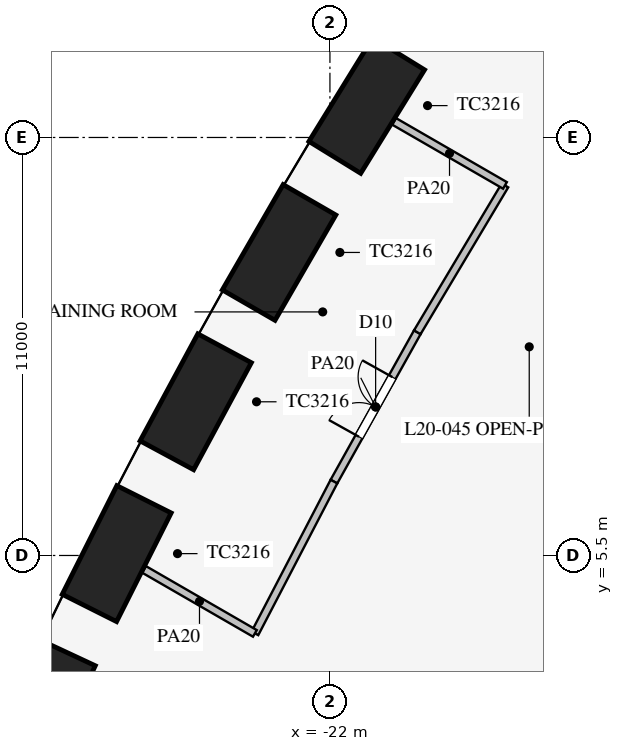
"""IFC4 building model, lengths in metres.
Left out: names, types, materials, properties, quantities, classifications, styles, units other than length and angle.
Written with IfcOpenShell. Run it as: python <this file> out.ifc"""

import sys

from ifc_helpers import new_model, si_unit, direction, frame, frame_2d, origin, origin_2d, place, context, subcontext, project, spatial, rectangle, extrude, element, fill, save


model = new_model("IFC4")
c1 = context("Model", 3, precision=1e-05, world=origin(), true_north=direction((0.0, 1.0)))
c2 = subcontext(c1, "Body", "Model", "MODEL_VIEW")
j1 = project(units=[si_unit("LENGTHUNIT", "METRE"), si_unit("PLANEANGLEUNIT", "RADIAN")], contexts=[c1])
p1 = place(None, origin())
s1 = spatial("IfcSite", under=j1, at=p1, CompositionType="ELEMENT")
p2 = place(p1, origin())
s2 = spatial("IfcBuilding", under=s1, at=p2, CompositionType="ELEMENT")
p3 = place(p2, frame((0.0, 0.0, 87.9)))
s3 = spatial("IfcBuildingStorey", under=s2, at=p3, CompositionType="ELEMENT", Elevation=87.9)
for number, where, z_axis, x_axis in (
    (1, (-21.031, 17.339, 0.0), (0.0, 0.0, 1.0), (-0.525, -0.851, 0.0)),
    (2, (-23.338, 13.474, 0.0), (0.0, 0.0, 1.0), (-0.5, -0.866, 0.0)),
    (3, (-25.531, 9.544, 0.0), (0.0, 0.0, 1.0), (-0.475, -0.88, 0.0)),
    (4, (-27.611, 5.549, 0.0), (0.0, 0.0, 1.0), (-0.449, -0.894, 0.0)),
    (5, (-29.576, 1.487, 0.0), (0.0, 0.0, 1.0), (-0.423, -0.906, 0.0)),
):
    element("IfcColumn", number, at=place(p3, frame(where, z_axis=z_axis, x_axis=x_axis)), inside=s3, PredefinedType="COLUMN", context=c2, shape_type="SweptSolid", body=[
        extrude(rectangle(XDim=3.2, YDim=1.6, at=origin_2d()), origin(), (0.0, 0.0, 1.0), 4.2),
    ])
p4 = place(p3, frame((-5.773, 16.0, 0.0), z_axis=(0.0, 0.0, 1.0), x_axis=(-0.500002442456, -0.866023993627, 0.0)))
e6 = element("IfcWall", 6, at=p4, inside=s3, PredefinedType="SHEAR", context=c2, shape_type="SweptSolid", body=[
    extrude(rectangle(XDim=21.939, YDim=0.8, at=frame_2d((10.97, 0.0))), origin(), (0.0, 0.0, 1.0), 4.2),
])
p5 = place(p4, frame((17.27, 0.0, 0.0)))
e7 = element("IfcOpeningElement", 7, at=p5, cuts=e6, PredefinedType="OPENING", context=c2, shape_type="SweptSolid", body=[
    extrude(rectangle(XDim=1.2, YDim=2.1, at=frame_2d((0.6, 1.05))), frame((0.0, 0.41, 0.0), z_axis=(0.0, -1.0, 0.0), x_axis=(1.0, 0.0, 0.0)), (0.0, 0.0, 1.0), 0.82),
])
p6 = place(p4, frame((3.47, 0.0, 0.0)))
e8 = element("IfcOpeningElement", 8, at=p6, cuts=e6, PredefinedType="OPENING", context=c2, shape_type="SweptSolid", body=[
    extrude(rectangle(XDim=1.2, YDim=2.1, at=frame_2d((0.6, 1.05))), frame((0.0, 0.41, 0.0), z_axis=(0.0, -1.0, 0.0), x_axis=(1.0, 0.0, 0.0)), (0.0, 0.0, 1.0), 0.82),
])
p7 = place(p3, frame((-19.701, 11.374, 0.0), z_axis=(0.0, 0.0, 1.0), x_axis=(-0.487415216275, -0.87317031955, 0.0)))
e9 = element("IfcWall", 9, at=p7, inside=s3, PredefinedType="PARTITIONING", context=c2, shape_type="SweptSolid", body=[
    extrude(rectangle(XDim=4.5, YDim=0.2, at=frame_2d((2.25, 0.0))), origin(), (0.0, 0.0, 1.0), 2.9),
])
p8 = place(p7, frame((1.35, 0.0, 0.15)))
e10 = element("IfcOpeningElement", 10, at=p8, cuts=e9, PredefinedType="OPENING", context=c2, shape_type="SweptSolid", body=[
    extrude(rectangle(XDim=1.8, YDim=2.1, at=frame_2d((0.9, 1.05))), frame((0.0, 0.11, 0.0), z_axis=(0.0, -1.0, 0.0), x_axis=(1.0, 0.0, 0.0)), (0.0, 0.0, 1.0), 0.22),
])
p9 = place(p3, frame((-21.895, 7.445, 0.0), z_axis=(0.0, 0.0, 1.0), x_axis=(-0.461810056307, -0.886978845235, 0.0)))
e11 = element("IfcWall", 11, at=p9, inside=s3, PredefinedType="PARTITIONING", context=c2, shape_type="SweptSolid", body=[
    extrude(rectangle(XDim=4.504, YDim=0.2, at=frame_2d((2.252, 0.0))), origin(), (0.0, 0.0, 1.0), 2.9),
])
p10 = place(p3, frame((-17.395, 15.239, 0.0), z_axis=(0.0, 0.0, 1.0), x_axis=(-0.512483962191, -0.858696796604, 0.0)))
e12 = element("IfcWall", 12, at=p10, inside=s3, PredefinedType="PARTITIONING", context=c2, shape_type="SweptSolid", body=[
    extrude(rectangle(XDim=4.5, YDim=0.2, at=frame_2d((2.25, 0.0))), origin(), (0.0, 0.0, 1.0), 2.9),
])
p11 = place(p3, frame((-23.975, 3.449, 0.0), z_axis=(0.0, 0.0, 1.0), x_axis=(-0.866039498442, 0.499975586543, 0.0)))
e13 = element("IfcWall", 13, at=p11, inside=s3, PredefinedType="PARTITIONING", context=c2, shape_type="SweptSolid", body=[
    extrude(rectangle(XDim=3.367, YDim=0.2, at=frame_2d((1.684, 0.0))), origin(), (0.0, 0.0, 1.0), 2.15),
])
p12 = place(p3, frame((-17.395, 15.239, 0.0), z_axis=(0.0, 0.0, 1.0), x_axis=(-0.865991297194, 0.500059069696, 0.0)))
e14 = element("IfcWall", 14, at=p12, inside=s3, PredefinedType="PARTITIONING", context=c2, shape_type="SweptSolid", body=[
    extrude(rectangle(XDim=3.369, YDim=0.2, at=frame_2d((1.685, 0.0))), origin(), (0.0, 0.0, 1.0), 2.15),
])
p13 = place(p8, frame((1.8, 0.0, 0.0), z_axis=(0.0, 0.0, 1.0), x_axis=(-1.0, 0.0, 0.0)))
e15 = element("IfcDoor", 15, at=p13, inside=s3, OperationType="DOUBLE_DOOR_SINGLE_SWING", PredefinedType="DOOR", context=c2, shape_type="SweptSolid", body=[
    extrude(rectangle(XDim=1.8, YDim=2.1, at=frame_2d((0.9, 1.05))), frame((0.0, 0.025, 0.0), z_axis=(0.0, -1.0, 0.0), x_axis=(1.0, 0.0, 0.0)), (0.0, 0.0, 1.0), 0.05),
])
fill(e10, e15)
save(model, sys.argv[1])
